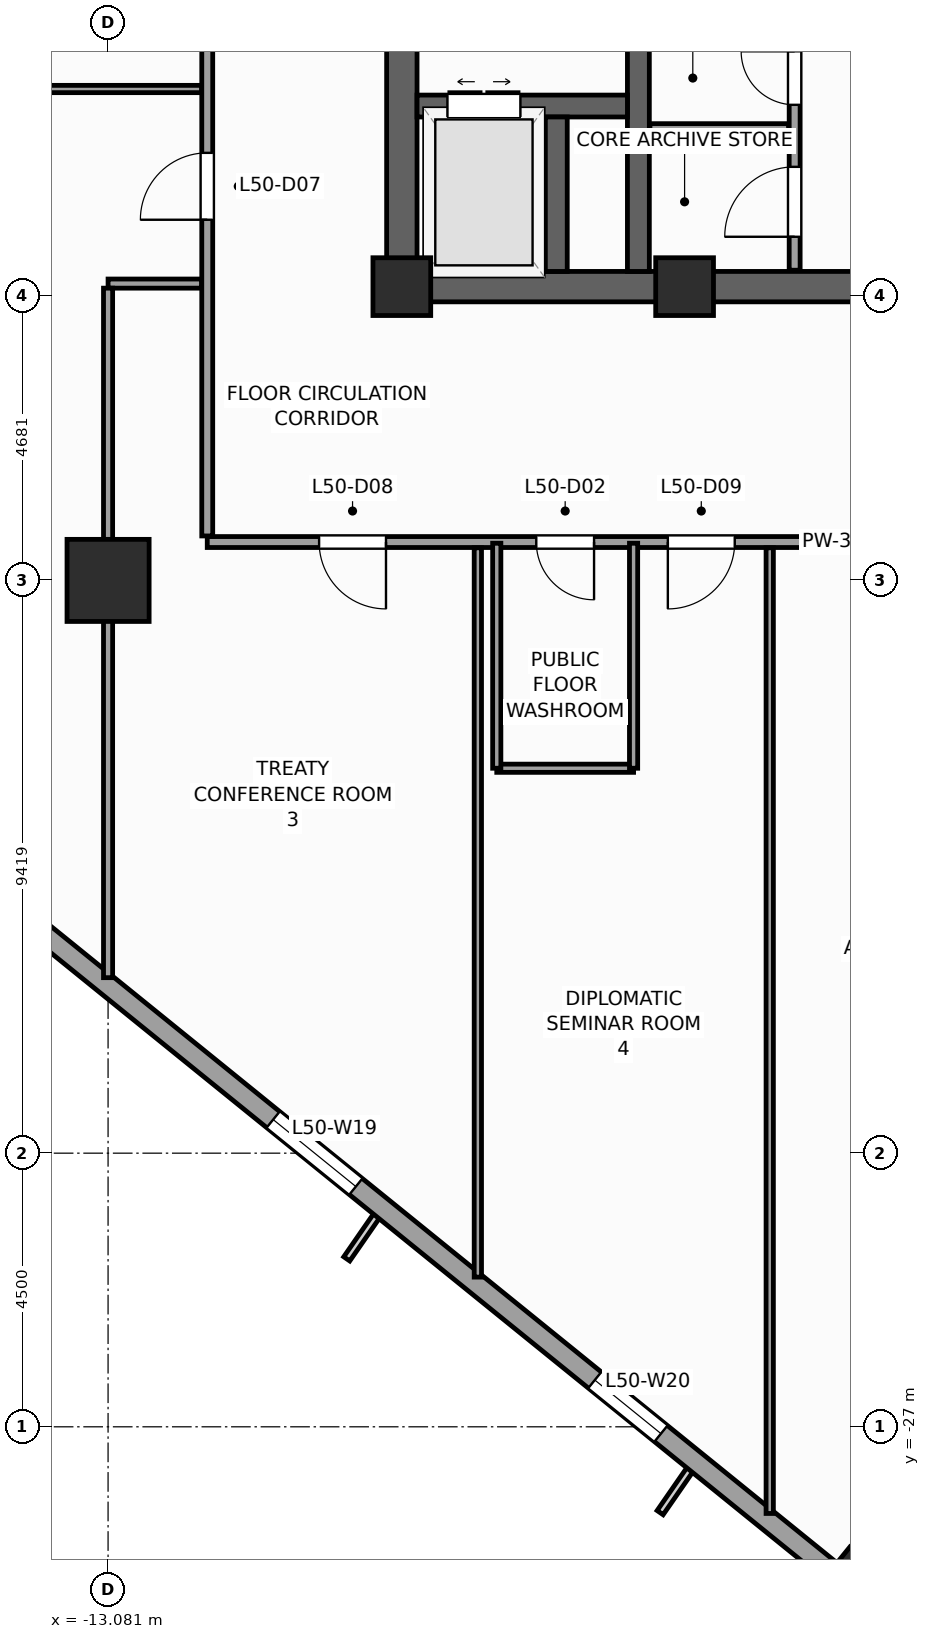
"""IFC4 building model, lengths in metres.
Left out: names, types, materials, properties, quantities, classifications, styles, units other than length and angle.
Written with IfcOpenShell. Run it as: python <this file> out.ifc"""

import sys

from ifc_helpers import new_model, si_unit, direction, frame, frame_2d, origin, origin_2d, place, context, subcontext, project, spatial, rectangle, extrude, source, transform, mapped, element, fill, save


model = new_model("IFC4")
c1 = context("Model", 3, precision=1e-05, world=origin(), true_north=direction((0.0, 1.0)))
c2 = subcontext(c1, "Body", "Model", "MODEL_VIEW")
j1 = project(units=[si_unit("LENGTHUNIT", "METRE"), si_unit("PLANEANGLEUNIT", "RADIAN")], contexts=[c1])
p1 = place(None, origin())
s1 = spatial("IfcSite", under=j1, at=p1, CompositionType="ELEMENT")
p2 = place(p1, origin())
s2 = spatial("IfcBuilding", under=s1, at=p2, CompositionType="ELEMENT")
p3 = place(p2, frame((0.0, 0.0, 209.5)))
s3 = spatial("IfcBuildingStorey", under=s2, at=p3, CompositionType="ELEMENT", Elevation=209.5)
p4 = place(p3, frame((-8.5, -8.25, 0.0), z_axis=(0.0, 0.0, 1.0), x_axis=(1.0, 0.0, 0.0)))
e1 = element("IfcWall", 1, at=p4, inside=s3, PredefinedType="SHEAR", context=c2, shape_type="SweptSolid", body=[
    extrude(rectangle(XDim=17.0, YDim=0.5, at=frame_2d((8.5, 0.0))), origin(), (0.0, 0.0, 1.0), 3.9),
])
p5 = place(p4, frame((7.85, 0.0, 0.0)))
e2 = element("IfcOpeningElement", 2, at=p5, cuts=e1, PredefinedType="OPENING", context=c2, shape_type="SweptSolid", body=[
    extrude(rectangle(XDim=1.3, YDim=2.2, at=frame_2d((0.65, 1.1))), frame((0.0, 0.26, 0.0), z_axis=(0.0, -1.0, 0.0), x_axis=(1.0, 0.0, 0.0)), (0.0, 0.0, 1.0), 0.52),
])
p6 = place(p3, frame((-8.25, -8.0, 0.0), z_axis=(0.0, 0.0, 1.0), x_axis=(0.0, 1.0, 0.0)))
e3 = element("IfcWall", 3, at=p6, inside=s3, PredefinedType="SHEAR", context=c2, shape_type="SweptSolid", body=[
    extrude(rectangle(XDim=16.0, YDim=0.5, at=frame_2d((8.0, 0.0))), origin(), (0.0, 0.0, 1.0), 3.9),
])
p7 = place(p6, frame((4.69, 0.0, 0.0)))
e4 = element("IfcOpeningElement", 4, at=p7, cuts=e3, PredefinedType="OPENING", context=c2, shape_type="SweptSolid", body=[
    extrude(rectangle(XDim=1.3, YDim=2.2, at=frame_2d((0.65, 1.1))), frame((0.0, 0.26, 0.0), z_axis=(0.0, -1.0, 0.0), x_axis=(1.0, 0.0, 0.0)), (0.0, 0.0, 1.0), 0.52),
])
p8 = place(p3, frame((-4.36, -8.0, 0.0), z_axis=(0.0, 0.0, 1.0), x_axis=(0.0, 1.0, 0.0)))
e5 = element("IfcWall", 5, at=p8, inside=s3, PredefinedType="SHEAR", context=c2, shape_type="SweptSolid", body=[
    extrude(rectangle(XDim=16.0, YDim=0.36, at=frame_2d((8.0, 0.0))), origin(), (0.0, 0.0, 1.0), 3.9),
])
p9 = place(p3, frame((-8.0, -5.28, 0.0), z_axis=(0.0, 0.0, 1.0), x_axis=(1.0, 0.0, 0.0)))
e6 = element("IfcWall", 6, at=p9, inside=s3, PredefinedType="SHEAR", context=c2, shape_type="SweptSolid", body=[
    extrude(rectangle(XDim=3.46, YDim=0.36, at=frame_2d((1.73, 0.0))), origin(), (0.0, 0.0, 1.0), 3.9),
])
p10 = place(p9, frame((0.5, 0.0, 0.0)))
e7 = element("IfcOpeningElement", 7, at=p10, cuts=e6, PredefinedType="OPENING", context=c2, shape_type="SweptSolid", body=[
    extrude(rectangle(XDim=1.2, YDim=2.25, at=frame_2d((0.6, 1.125))), frame((0.0, 0.19, 0.0), z_axis=(0.0, -1.0, 0.0), x_axis=(1.0, 0.0, 0.0)), (0.0, 0.0, 1.0), 0.38),
])
p11 = place(p3, frame((-5.71, -8.0, 0.0), z_axis=(0.0, 0.0, 1.0), x_axis=(0.0, 1.0, 0.0)))
e8 = element("IfcWall", 8, at=p11, inside=s3, PredefinedType="SHEAR", context=c2, shape_type="SweptSolid", body=[
    extrude(rectangle(XDim=2.54, YDim=0.36, at=frame_2d((1.27, 0.0))), origin(), (0.0, 0.0, 1.0), 3.9),
])
m1 = source(origin(), c2, "Body", "SweptSolid", [
    extrude(rectangle(XDim=0.95, YDim=0.95, at=origin_2d()), origin(), (0.0, 0.0, 1.0), 3.9),
])
for number, where, z_axis, x_axis in (
    (9, (-8.25, -8.25, 0.0), (0.0, 0.0, 1.0), (1.0, 0.0, 0.0)),
    (10, (-3.6, -8.25, 0.0), (0.0, 0.0, 1.0), (1.0, 0.0, 0.0)),
):
    element("IfcColumn", number, at=place(p3, frame(where, z_axis=z_axis, x_axis=x_axis)), inside=s3, PredefinedType="PILASTER", context=c2, shape_type="MappedRepresentation", body=[
        mapped(m1, transform((0.0, 0.0, 0.0), scale=1.0)),
    ])
m2 = source(origin(), c2, "Body", "SweptSolid", [
    extrude(rectangle(XDim=1.35, YDim=1.35, at=origin_2d()), origin(), (0.0, 0.0, 1.0), 3.9),
])
p12 = place(p3, frame((-13.081, -13.081, 0.0), z_axis=(0.0, 0.0, 1.0), x_axis=(1.0, 0.0, 0.0)))
e11 = element("IfcColumn", 11, at=p12, inside=s3, PredefinedType="COLUMN", context=c2, shape_type="MappedRepresentation", body=[
    mapped(m2, transform((0.0, 0.0, 0.0), scale=1.0)),
])
m3 = source(origin(), c2, "Body", "SweptSolid", [
    extrude(rectangle(XDim=0.65, YDim=0.7, at=origin_2d()), origin(), (0.0, 0.0, 1.0), 3.9),
])
p13 = place(p3, frame((-0.815, -29.45, 0.0), z_axis=(0.0, 0.0, 1.0), x_axis=(0.62932039105, 0.777145961457, 0.0)))
e12 = element("IfcColumn", 12, at=p13, inside=s3, PredefinedType="COLUMN", context=c2, shape_type="MappedRepresentation", body=[
    mapped(m3, transform((0.0, 0.0, 0.0), scale=1.0)),
])
p14 = place(p3, frame((-29.154, -6.733, 0.0), z_axis=(0.0, 0.0, 1.0), x_axis=(0.77714192302, -0.629325378072, 0.0)))
e13 = element("IfcWall", 13, at=p14, inside=s3, PredefinedType="STANDARD", context=c2, shape_type="SweptSolid", body=[
    extrude(rectangle(XDim=36.84, YDim=0.34, at=frame_2d((18.42, 0.0))), origin(), (0.0, 0.0, 1.0), 2.96),
])
p15 = place(p14, frame((3.721, 0.0, 0.48)))
e14 = element("IfcOpeningElement", 14, at=p15, cuts=e13, PredefinedType="OPENING", context=c2, shape_type="SweptSolid", body=[
    extrude(rectangle(XDim=1.4, YDim=2.4, at=frame_2d((0.7, 1.2))), frame((0.0, 0.18, 0.0), z_axis=(0.0, -1.0, 0.0), x_axis=(1.0, 0.0, 0.0)), (0.0, 0.0, 1.0), 0.36),
])
p16 = place(p14, frame((9.809, 0.0, 0.58)))
e15 = element("IfcOpeningElement", 15, at=p16, cuts=e13, PredefinedType="OPENING", context=c2, shape_type="SweptSolid", body=[
    extrude(rectangle(XDim=1.75, YDim=2.3, at=frame_2d((0.875, 1.15))), frame((0.0, 0.18, 0.0), z_axis=(0.0, -1.0, 0.0), x_axis=(1.0, 0.0, 0.0)), (0.0, 0.0, 1.0), 0.36),
])
p17 = place(p14, frame((16.058, 0.0, 0.58)))
e16 = element("IfcOpeningElement", 16, at=p17, cuts=e13, PredefinedType="OPENING", context=c2, shape_type="SweptSolid", body=[
    extrude(rectangle(XDim=1.75, YDim=2.3, at=frame_2d((0.875, 1.15))), frame((0.0, 0.18, 0.0), z_axis=(0.0, -1.0, 0.0), x_axis=(1.0, 0.0, 0.0)), (0.0, 0.0, 1.0), 0.36),
])
p18 = place(p14, frame((24.176, 0.0, 0.58)))
e17 = element("IfcOpeningElement", 17, at=p18, cuts=e13, PredefinedType="OPENING", context=c2, shape_type="SweptSolid", body=[
    extrude(rectangle(XDim=1.75, YDim=2.3, at=frame_2d((0.875, 1.15))), frame((0.0, 0.18, 0.0), z_axis=(0.0, -1.0, 0.0), x_axis=(1.0, 0.0, 0.0)), (0.0, 0.0, 1.0), 0.36),
])
p19 = place(p14, frame((30.982, 0.0, 0.48)))
e18 = element("IfcOpeningElement", 18, at=p19, cuts=e13, PredefinedType="OPENING", context=c2, shape_type="SweptSolid", body=[
    extrude(rectangle(XDim=1.4, YDim=2.4, at=frame_2d((0.7, 1.2))), frame((0.0, 0.18, 0.0), z_axis=(0.0, -1.0, 0.0), x_axis=(1.0, 0.0, 0.0)), (0.0, 0.0, 1.0), 0.36),
])
p20 = place(p3, frame((-0.789, -29.703, 0.0), z_axis=(0.0, 0.0, 1.0), x_axis=(0.629323365087, 0.77714355312, 0.0)))
e19 = element("IfcWall", 19, at=p20, inside=s3, PredefinedType="STANDARD", context=c2, shape_type="SweptSolid", body=[
    extrude(rectangle(XDim=5.5, YDim=0.34, at=frame_2d((2.75, 0.0))), origin(), (0.0, 0.0, 1.0), 3.66),
])
p21 = place(p3, frame((-1.79, -7.98, 0.0), z_axis=(0.0, 0.0, 1.0), x_axis=(0.0, 1.0, 0.0)))
e20 = element("IfcWall", 20, at=p21, inside=s3, PredefinedType="PARTITIONING", context=c2, shape_type="SweptSolid", body=[
    extrude(rectangle(XDim=12.38, YDim=0.18, at=frame_2d((6.19, 0.0))), origin(), (0.0, 0.0, 1.0), 3.66),
])
p22 = place(p21, frame((4.6, 0.0, 0.0)))
e21 = element("IfcOpeningElement", 21, at=p22, cuts=e20, PredefinedType="OPENING", context=c2, shape_type="SweptSolid", body=[
    extrude(rectangle(XDim=1.1, YDim=2.2, at=frame_2d((0.55, 1.1))), frame((0.0, 0.1, 0.0), z_axis=(0.0, -1.0, 0.0), x_axis=(1.0, 0.0, 0.0)), (0.0, 0.0, 1.0), 0.2),
])
p23 = place(p21, frame((6.66, 0.0, 0.0)))
e22 = element("IfcOpeningElement", 22, at=p23, cuts=e20, PredefinedType="OPENING", context=c2, shape_type="SweptSolid", body=[
    extrude(rectangle(XDim=1.1, YDim=2.2, at=frame_2d((0.55, 1.1))), frame((0.0, 0.1, 0.0), z_axis=(0.0, -1.0, 0.0), x_axis=(1.0, 0.0, 0.0)), (0.0, 0.0, 1.0), 0.2),
])
p24 = place(p21, frame((0.55, 0.0, 0.0)))
e23 = element("IfcOpeningElement", 23, at=p24, cuts=e20, PredefinedType="OPENING", context=c2, shape_type="SweptSolid", body=[
    extrude(rectangle(XDim=1.15, YDim=2.25, at=frame_2d((0.575, 1.125))), frame((0.0, 0.1, 0.0), z_axis=(0.0, -1.0, 0.0), x_axis=(1.0, 0.0, 0.0)), (0.0, 0.0, 1.0), 0.2),
])
p25 = place(p21, frame((2.72, 0.0, 0.0)))
e24 = element("IfcOpeningElement", 24, at=p25, cuts=e20, PredefinedType="OPENING", context=c2, shape_type="SweptSolid", body=[
    extrude(rectangle(XDim=0.88, YDim=2.1, at=frame_2d((0.44, 1.05))), frame((0.0, 0.1, 0.0), z_axis=(0.0, -1.0, 0.0), x_axis=(1.0, 0.0, 0.0)), (0.0, 0.0, 1.0), 0.2),
])
p26 = place(p3, frame((-4.17, -5.65, 0.0), z_axis=(0.0, 0.0, 1.0), x_axis=(1.0, 0.0, 0.0)))
e25 = element("IfcWall", 25, at=p26, inside=s3, PredefinedType="PARTITIONING", context=c2, shape_type="SweptSolid", body=[
    extrude(rectangle(XDim=2.28, YDim=0.16, at=frame_2d((1.14, 0.0))), origin(), (0.0, 0.0, 1.0), 3.66),
])
p27 = place(p3, frame((-11.45, -12.45, 0.0), z_axis=(0.0, 0.0, 1.0), x_axis=(1.0, 0.0, 0.0)))
e26 = element("IfcWall", 26, at=p27, inside=s3, PredefinedType="PARTITIONING", context=c2, shape_type="SweptSolid", body=[
    extrude(rectangle(XDim=21.75, YDim=0.18, at=frame_2d((10.875, 0.0))), origin(), (0.0, 0.0, 1.0), 3.66),
])
p28 = place(p27, frame((5.411, 0.0, 0.0)))
e27 = element("IfcOpeningElement", 27, at=p28, cuts=e26, PredefinedType="OPENING", context=c2, shape_type="SweptSolid", body=[
    extrude(rectangle(XDim=0.95, YDim=2.1, at=frame_2d((0.475, 1.05))), frame((0.0, 0.1, 0.0), z_axis=(0.0, -1.0, 0.0), x_axis=(1.0, 0.0, 0.0)), (0.0, 0.0, 1.0), 0.2),
])
p29 = place(p27, frame((1.839, 0.0, 0.0)))
e28 = element("IfcOpeningElement", 28, at=p29, cuts=e26, PredefinedType="OPENING", context=c2, shape_type="SweptSolid", body=[
    extrude(rectangle(XDim=1.1, YDim=2.2, at=frame_2d((0.55, 1.1))), frame((0.0, 0.1, 0.0), z_axis=(0.0, -1.0, 0.0), x_axis=(1.0, 0.0, 0.0)), (0.0, 0.0, 1.0), 0.2),
])
p30 = place(p27, frame((7.574, 0.0, 0.0)))
e29 = element("IfcOpeningElement", 29, at=p30, cuts=e26, PredefinedType="OPENING", context=c2, shape_type="SweptSolid", body=[
    extrude(rectangle(XDim=1.1, YDim=2.2, at=frame_2d((0.55, 1.1))), frame((0.0, 0.1, 0.0), z_axis=(0.0, -1.0, 0.0), x_axis=(1.0, 0.0, 0.0)), (0.0, 0.0, 1.0), 0.2),
])
p31 = place(p27, frame((11.05, 0.0, 0.0)))
e30 = element("IfcOpeningElement", 30, at=p31, cuts=e26, PredefinedType="OPENING", context=c2, shape_type="SweptSolid", body=[
    extrude(rectangle(XDim=1.1, YDim=2.2, at=frame_2d((0.55, 1.1))), frame((0.0, 0.1, 0.0), z_axis=(0.0, -1.0, 0.0), x_axis=(1.0, 0.0, 0.0)), (0.0, 0.0, 1.0), 0.2),
])
p32 = place(p27, frame((15.65, 0.0, 0.0)))
e31 = element("IfcOpeningElement", 31, at=p32, cuts=e26, PredefinedType="OPENING", context=c2, shape_type="SweptSolid", body=[
    extrude(rectangle(XDim=1.1, YDim=2.2, at=frame_2d((0.55, 1.1))), frame((0.0, 0.1, 0.0), z_axis=(0.0, -1.0, 0.0), x_axis=(1.0, 0.0, 0.0)), (0.0, 0.0, 1.0), 0.2),
])
p33 = place(p3, frame((-11.45, -12.35, 0.0), z_axis=(0.0, 0.0, 1.0), x_axis=(0.0, 1.0, 0.0)))
e32 = element("IfcWall", 32, at=p33, inside=s3, PredefinedType="PARTITIONING", context=c2, shape_type="SweptSolid", body=[
    extrude(rectangle(XDim=10.95, YDim=0.18, at=frame_2d((5.475, 0.0))), origin(), (0.0, 0.0, 1.0), 3.66),
])
p34 = place(p33, frame((8.436, 0.0, 0.0)))
e33 = element("IfcOpeningElement", 33, at=p34, cuts=e32, PredefinedType="OPENING", context=c2, shape_type="SweptSolid", body=[
    extrude(rectangle(XDim=1.1, YDim=2.2, at=frame_2d((0.55, 1.1))), frame((0.0, 0.1, 0.0), z_axis=(0.0, -1.0, 0.0), x_axis=(1.0, 0.0, 0.0)), (0.0, 0.0, 1.0), 0.2),
])
p35 = place(p33, frame((5.2, 0.0, 0.0)))
e34 = element("IfcOpeningElement", 34, at=p35, cuts=e32, PredefinedType="OPENING", context=c2, shape_type="SweptSolid", body=[
    extrude(rectangle(XDim=1.1, YDim=2.2, at=frame_2d((0.55, 1.1))), frame((0.0, 0.1, 0.0), z_axis=(0.0, -1.0, 0.0), x_axis=(1.0, 0.0, 0.0)), (0.0, 0.0, 1.0), 0.2),
])
p36 = place(p3, frame((-11.545, -8.2, 0.0), z_axis=(0.0, 0.0, 1.0), x_axis=(-1.0, 0.0, 0.0)))
e35 = element("IfcWall", 35, at=p36, inside=s3, PredefinedType="PARTITIONING", context=c2, shape_type="SweptSolid", body=[
    extrude(rectangle(XDim=1.536, YDim=0.15, at=frame_2d((0.768, 0.0))), origin(), (0.0, 0.0, 1.0), 3.66),
])
p37 = place(p3, frame((-13.081, -8.275, 0.0), z_axis=(0.0, 0.0, 1.0), x_axis=(0.0, -1.0, 0.0)))
e36 = element("IfcWall", 36, at=p37, inside=s3, PredefinedType="PARTITIONING", context=c2, shape_type="SweptSolid", body=[
    extrude(rectangle(XDim=11.339, YDim=0.15, at=frame_2d((5.669, 0.0))), origin(), (0.0, 0.0, 1.0), 2.76),
])
p38 = place(p3, frame((-27.178, -5.0, 0.0), z_axis=(0.0, 0.0, 1.0), x_axis=(1.0, 0.0, 0.0)))
e37 = element("IfcWall", 37, at=p38, inside=s3, PredefinedType="PARTITIONING", context=c2, shape_type="SweptSolid", body=[
    extrude(rectangle(XDim=15.634, YDim=0.12, at=frame_2d((7.817, 0.0))), origin(), (0.0, 0.0, 1.0), 3.66),
])
p39 = place(p3, frame((-7.0, -24.538, 0.0), z_axis=(0.0, 0.0, 1.0), x_axis=(0.0, 1.0, 0.0)))
e38 = element("IfcWall", 38, at=p39, inside=s3, PredefinedType="PARTITIONING", context=c2, shape_type="SweptSolid", body=[
    extrude(rectangle(XDim=11.993, YDim=0.12, at=frame_2d((5.997, 0.0))), origin(), (0.0, 0.0, 1.0), 3.66),
])
p40 = place(p3, frame((-2.2, -28.425, 0.0), z_axis=(0.0, 0.0, 1.0), x_axis=(0.0, 1.0, 0.0)))
e39 = element("IfcWall", 39, at=p40, inside=s3, PredefinedType="PARTITIONING", context=c2, shape_type="SweptSolid", body=[
    extrude(rectangle(XDim=15.88, YDim=0.12, at=frame_2d((7.94, 0.0))), origin(), (0.0, 0.0, 1.0), 3.66),
])
p41 = place(p3, frame((-6.689, -16.17, 0.0), z_axis=(0.0, 0.0, 1.0), x_axis=(1.0, 0.0, 0.0)))
e40 = element("IfcWall", 40, at=p41, inside=s3, PredefinedType="PARTITIONING", context=c2, shape_type="SweptSolid", body=[
    extrude(rectangle(XDim=2.25, YDim=0.135, at=frame_2d((1.125, 0.0))), origin(), (0.0, 0.0, 1.0), 3.66),
])
for number, where, z_axis, x_axis in (
    (41, (-4.439, -16.17, 0.0), (0.0, 0.0, 1.0), (0.0, 1.0, 0.0)),
    (42, (-6.689, -16.17, 0.0), (0.0, 0.0, 1.0), (0.0, 1.0, 0.0)),
):
    element("IfcWall", number, at=place(p3, frame(where, z_axis=z_axis, x_axis=x_axis)), inside=s3, PredefinedType="PARTITIONING", context=c2, shape_type="SweptSolid", body=[
        extrude(rectangle(XDim=3.7, YDim=0.135, at=frame_2d((1.85, 0.0))), origin(), (0.0, 0.0, 1.0), 3.66),
    ])
m4 = source(origin(), c2, "Body", "SweptSolid", [
    extrude(rectangle(XDim=1.75, YDim=2.3, at=frame_2d((0.875, 1.15))), frame((0.0, 0.03, 0.0), z_axis=(0.0, -1.0, 0.0), x_axis=(1.0, 0.0, 0.0)), (0.0, 0.0, 1.0), 0.06),
])
p42 = place(p18, origin())
e43 = element("IfcWindow", 43, at=p42, inside=s3, PartitioningType="SINGLE_PANEL", PredefinedType="WINDOW", context=c2, shape_type="MappedRepresentation", body=[
    mapped(m4, transform((0.0, 0.0, 0.0), scale=1.0)),
])
fill(e17, e43)
m5 = source(origin(), c2, "Body", "SweptSolid", [
    extrude(rectangle(XDim=1.4, YDim=2.4, at=frame_2d((0.7, 1.2))), frame((0.0, 0.03, 0.0), z_axis=(0.0, -1.0, 0.0), x_axis=(1.0, 0.0, 0.0)), (0.0, 0.0, 1.0), 0.06),
])
p43 = place(p19, origin())
e44 = element("IfcWindow", 44, at=p43, inside=s3, PartitioningType="SINGLE_PANEL", PredefinedType="WINDOW", context=c2, shape_type="MappedRepresentation", body=[
    mapped(m5, transform((0.0, 0.0, 0.0), scale=1.0)),
])
fill(e18, e44)
m6 = source(origin(), c2, "Body", "SweptSolid", [
    extrude(rectangle(XDim=1.2, YDim=2.25, at=frame_2d((0.6, 1.125))), frame((0.0, 0.025, 0.0), z_axis=(0.0, -1.0, 0.0), x_axis=(1.0, 0.0, 0.0)), (0.0, 0.0, 1.0), 0.05),
])
p44 = place(p10, origin())
e45 = element("IfcDoor", 45, at=p44, inside=s3, OperationType="DOUBLE_DOOR_SLIDING", PredefinedType="DOOR", context=c2, shape_type="MappedRepresentation", body=[
    mapped(m6, transform((0.0, 0.0, 0.0), scale=1.0)),
])
fill(e7, e45)
m7 = source(origin(), c2, "Body", "SweptSolid", [
    extrude(rectangle(XDim=1.15, YDim=2.25, at=frame_2d((0.575, 1.125))), frame((0.0, 0.025, 0.0), z_axis=(0.0, -1.0, 0.0), x_axis=(1.0, 0.0, 0.0)), (0.0, 0.0, 1.0), 0.05),
])
p45 = place(p24, origin())
e46 = element("IfcDoor", 46, at=p45, inside=s3, OperationType="SINGLE_SWING_LEFT", PredefinedType="DOOR", context=c2, shape_type="MappedRepresentation", body=[
    mapped(m7, transform((0.0, 0.0, 0.0), scale=1.0)),
])
fill(e23, e46)
m8 = source(origin(), c2, "Body", "SweptSolid", [
    extrude(rectangle(XDim=0.88, YDim=2.1, at=frame_2d((0.44, 1.05))), frame((0.0, 0.025, 0.0), z_axis=(0.0, -1.0, 0.0), x_axis=(1.0, 0.0, 0.0)), (0.0, 0.0, 1.0), 0.05),
])
p46 = place(p25, origin())
e47 = element("IfcDoor", 47, at=p46, inside=s3, OperationType="SINGLE_SWING_RIGHT", PredefinedType="DOOR", context=c2, shape_type="MappedRepresentation", body=[
    mapped(m8, transform((0.0, 0.0, 0.0), scale=1.0)),
])
fill(e24, e47)
m9 = source(origin(), c2, "Body", "SweptSolid", [
    extrude(rectangle(XDim=0.95, YDim=2.1, at=frame_2d((0.475, 1.05))), frame((0.0, 0.025, 0.0), z_axis=(0.0, -1.0, 0.0), x_axis=(1.0, 0.0, 0.0)), (0.0, 0.0, 1.0), 0.05),
])
p47 = place(p28, frame((0.95, 0.0, 0.0), z_axis=(0.0, 0.0, 1.0), x_axis=(-1.0, 0.0, 0.0)))
e48 = element("IfcDoor", 48, at=p47, inside=s3, OperationType="SINGLE_SWING_RIGHT", PredefinedType="DOOR", context=c2, shape_type="MappedRepresentation", body=[
    mapped(m9, transform((0.0, 0.0, 0.0), scale=1.0)),
])
fill(e27, e48)
m10 = source(origin(), c2, "Body", "SweptSolid", [
    extrude(rectangle(XDim=1.1, YDim=2.2, at=frame_2d((0.55, 1.1))), frame((0.0, 0.025, 0.0), z_axis=(0.0, -1.0, 0.0), x_axis=(1.0, 0.0, 0.0)), (0.0, 0.0, 1.0), 0.05),
])
p48 = place(p35, origin())
e49 = element("IfcDoor", 49, at=p48, inside=s3, OperationType="SINGLE_SWING_LEFT", PredefinedType="DOOR", context=c2, shape_type="MappedRepresentation", body=[
    mapped(m10, transform((0.0, 0.0, 0.0), scale=1.0)),
])
fill(e34, e49)
p49 = place(p29, frame((1.1, 0.0, 0.0), z_axis=(0.0, 0.0, 1.0), x_axis=(-1.0, 0.0, 0.0)))
e50 = element("IfcDoor", 50, at=p49, inside=s3, OperationType="SINGLE_SWING_RIGHT", PredefinedType="DOOR", context=c2, shape_type="MappedRepresentation", body=[
    mapped(m10, transform((0.0, 0.0, 0.0), scale=1.0)),
])
fill(e28, e50)
p50 = place(p30, frame((1.1, 0.0, 0.0), z_axis=(0.0, 0.0, 1.0), x_axis=(-1.0, 0.0, 0.0)))
e51 = element("IfcDoor", 51, at=p50, inside=s3, OperationType="SINGLE_SWING_LEFT", PredefinedType="DOOR", context=c2, shape_type="MappedRepresentation", body=[
    mapped(m10, transform((0.0, 0.0, 0.0), scale=1.0)),
])
fill(e29, e51)
save(model, sys.argv[1])
